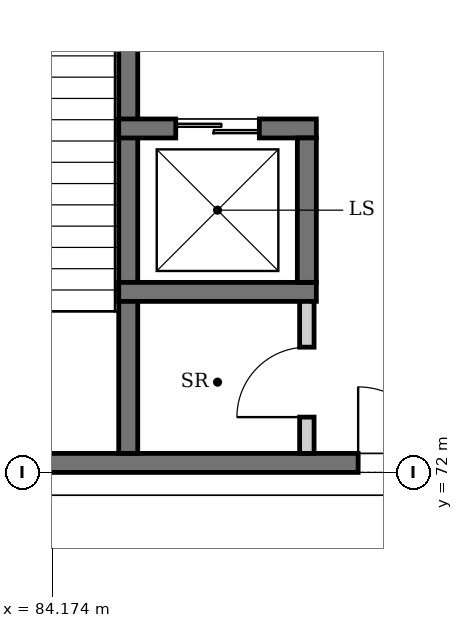
"""IFC4 building model, lengths in metres.
Left out: names, types, materials, properties, quantities, classifications, styles, units other than length and angle.
Written with IfcOpenShell. Run it as: python <this file> out.ifc"""

import sys

from ifc_helpers import new_model, si_unit, direction, frame, frame_2d, origin, place, context, subcontext, project, spatial, rectangle, extrude, element, fill, save


model = new_model("IFC4")
c1 = context("Model", 3, precision=1e-05, world=origin(), true_north=direction((0.0, 1.0)))
c2 = subcontext(c1, "Body", "Model", "MODEL_VIEW")
j1 = project(units=[si_unit("LENGTHUNIT", "METRE"), si_unit("PLANEANGLEUNIT", "RADIAN")], contexts=[c1])
p1 = place(None, origin())
s1 = spatial("IfcSite", under=j1, at=p1, CompositionType="ELEMENT")
p2 = place(p1, origin())
s2 = spatial("IfcBuilding", under=s1, at=p2, CompositionType="ELEMENT")
p3 = place(p2, origin())
s3 = spatial("IfcBuildingStorey", under=s2, at=p3, CompositionType="ELEMENT", Elevation=0.0)
p4 = place(p3, frame((81.25, 72.125, 0.0), z_axis=(0.0, 0.0, 1.0), x_axis=(1.0, 0.0, 0.0)))
e1 = element("IfcWall", 1, at=p4, inside=s3, PredefinedType="SHEAR", context=c2, shape_type="SweptSolid", body=[
    extrude(rectangle(XDim=8.5, YDim=0.25, at=frame_2d((4.25, 0.0))), origin(), (0.0, 0.0, 1.0), 6.0),
])
p5 = place(p4, frame((6.95, 0.0, 0.0)))
e2 = element("IfcOpeningElement", 2, at=p5, cuts=e1, PredefinedType="OPENING", context=c2, shape_type="SweptSolid", body=[
    extrude(rectangle(XDim=1.0, YDim=2.1, at=frame_2d((0.5, 1.05))), frame((0.0, 0.135, 0.0), z_axis=(0.0, -1.0, 0.0), x_axis=(1.0, 0.0, 0.0)), (0.0, 0.0, 1.0), 0.27),
])
p6 = place(p3, frame((85.175, 80.4, 0.0), z_axis=(0.0, 0.0, 1.0), x_axis=(0.0, -1.0, 0.0)))
e3 = element("IfcWall", 3, at=p6, inside=s3, PredefinedType="SOLIDWALL", context=c2, shape_type="SweptSolid", body=[
    extrude(rectangle(XDim=8.15, YDim=0.25, at=frame_2d((4.075, 0.0))), origin(), (0.0, 0.0, 1.0), 5.75),
])
p7 = place(p6, frame((0.4, 0.0, 0.0)))
e4 = element("IfcOpeningElement", 4, at=p7, cuts=e3, PredefinedType="OPENING", context=c2, shape_type="SweptSolid", body=[
    extrude(rectangle(XDim=1.0, YDim=2.1, at=frame_2d((0.5, 1.05))), frame((0.0, 0.135, 0.0), z_axis=(0.0, -1.0, 0.0), x_axis=(1.0, 0.0, 0.0)), (0.0, 0.0, 1.0), 0.27),
])
p8 = place(p3, frame((85.05, 74.375, -1.4), z_axis=(0.0, 0.0, 1.0), x_axis=(1.0, 0.0, 0.0)))
e5 = element("IfcWall", 5, at=p8, inside=s3, PredefinedType="SOLIDWALL", context=c2, shape_type="SweptSolid", body=[
    extrude(rectangle(XDim=2.6, YDim=0.25, at=frame_2d((1.3, 0.0))), origin(), (0.0, 0.0, 1.0), 7.4),
])
p9 = place(p3, frame((85.05, 76.525, -1.4), z_axis=(0.0, 0.0, 1.0), x_axis=(1.0, 0.0, 0.0)))
e6 = element("IfcWall", 6, at=p9, inside=s3, PredefinedType="SOLIDWALL", context=c2, shape_type="SweptSolid", body=[
    extrude(rectangle(XDim=2.6, YDim=0.25, at=frame_2d((1.3, 0.0))), origin(), (0.0, 0.0, 1.0), 7.4),
])
p10 = place(p9, frame((0.75, 0.0, 1.4)))
e7 = element("IfcOpeningElement", 7, at=p10, cuts=e6, PredefinedType="OPENING", context=c2, shape_type="SweptSolid", body=[
    extrude(rectangle(XDim=1.1, YDim=2.1, at=frame_2d((0.55, 1.05))), frame((0.0, 0.135, 0.0), z_axis=(0.0, -1.0, 0.0), x_axis=(1.0, 0.0, 0.0)), (0.0, 0.0, 1.0), 0.27),
])
p11 = place(p3, frame((87.525, 74.5, -1.4), z_axis=(0.0, 0.0, 1.0), x_axis=(0.0, 1.0, 0.0)))
e8 = element("IfcWall", 8, at=p11, inside=s3, PredefinedType="SOLIDWALL", context=c2, shape_type="SweptSolid", body=[
    extrude(rectangle(XDim=1.9, YDim=0.25, at=frame_2d((0.95, 0.0))), origin(), (0.0, 0.0, 1.0), 7.4),
])
p12 = place(p3, frame((87.525, 72.25, 0.0), z_axis=(0.0, 0.0, 1.0), x_axis=(0.0, 1.0, 0.0)))
e9 = element("IfcWall", 9, at=p12, inside=s3, PredefinedType="PARTITIONING", context=c2, shape_type="SweptSolid", body=[
    extrude(rectangle(XDim=2.0, YDim=0.19, at=frame_2d((1.0, 0.0))), origin(), (0.0, 0.0, 1.0), 5.75),
])
p13 = place(p12, frame((0.478, 0.0, 0.0)))
e10 = element("IfcOpeningElement", 10, at=p13, cuts=e9, PredefinedType="OPENING", context=c2, shape_type="SweptSolid", body=[
    extrude(rectangle(XDim=0.92, YDim=2.1, at=frame_2d((0.46, 1.05))), frame((0.0, 0.105, 0.0), z_axis=(0.0, -1.0, 0.0), x_axis=(1.0, 0.0, 0.0)), (0.0, 0.0, 1.0), 0.21),
])
p14 = place(p10, origin())
e11 = element("IfcDoor", 11, at=p14, inside=s3, OperationType="DOUBLE_DOOR_SLIDING", PredefinedType="DOOR", context=c2, shape_type="SweptSolid", body=[
    extrude(rectangle(XDim=1.1, YDim=2.1, at=frame_2d((0.55, 1.05))), frame((0.0, 0.025, 0.0), z_axis=(0.0, -1.0, 0.0), x_axis=(1.0, 0.0, 0.0)), (0.0, 0.0, 1.0), 0.05),
])
fill(e7, e11)
p15 = place(p5, origin())
e12 = element("IfcDoor", 12, at=p15, inside=s3, OperationType="SINGLE_SWING_LEFT", PredefinedType="DOOR", context=c2, shape_type="SweptSolid", body=[
    extrude(rectangle(XDim=1.0, YDim=2.1, at=frame_2d((0.5, 1.05))), frame((0.0, 0.025, 0.0), z_axis=(0.0, -1.0, 0.0), x_axis=(1.0, 0.0, 0.0)), (0.0, 0.0, 1.0), 0.05),
])
fill(e2, e12)
p16 = place(p13, origin())
e13 = element("IfcDoor", 13, at=p16, inside=s3, OperationType="SINGLE_SWING_LEFT", PredefinedType="DOOR", context=c2, shape_type="SweptSolid", body=[
    extrude(rectangle(XDim=0.92, YDim=2.1, at=frame_2d((0.46, 1.05))), frame((0.0, 0.025, 0.0), z_axis=(0.0, -1.0, 0.0), x_axis=(1.0, 0.0, 0.0)), (0.0, 0.0, 1.0), 0.05),
])
fill(e10, e13)
save(model, sys.argv[1])
